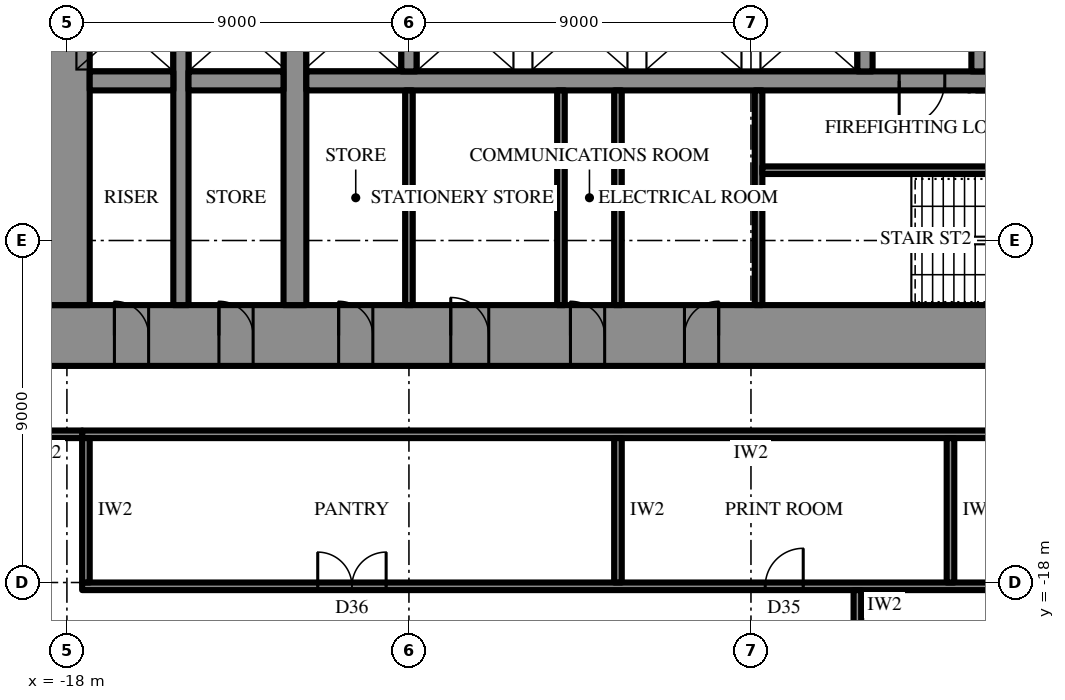
"""IFC4 building model, lengths in metres.
Left out: names, types, materials, properties, quantities, classifications, styles, units other than length and angle.
Written with IfcOpenShell. Run it as: python <this file> out.ifc"""

import sys

from ifc_helpers import new_model, si_unit, direction, frame, frame_2d, origin, place, context, subcontext, project, spatial, rectangle, extrude, element, fill, save


model = new_model("IFC4")
c1 = context("Model", 3, precision=1e-05, world=origin(), true_north=direction((0.0, 1.0)))
c2 = subcontext(c1, "Body", "Model", "MODEL_VIEW")
j1 = project(units=[si_unit("LENGTHUNIT", "METRE"), si_unit("PLANEANGLEUNIT", "RADIAN")], contexts=[c1])
p1 = place(None, origin())
s1 = spatial("IfcSite", under=j1, at=p1, CompositionType="ELEMENT")
p2 = place(p1, origin())
s2 = spatial("IfcBuilding", under=s1, at=p2, CompositionType="ELEMENT")
p3 = place(p2, frame((0.0, 0.0, 31.9)))
s3 = spatial("IfcBuildingStorey", under=s2, at=p3, CompositionType="ELEMENT", Elevation=31.9)
p4 = place(p3, frame((18.6, -11.5, 0.0), z_axis=(0.0, 0.0, 1.0), x_axis=(-1.0, 0.0, 0.0)))
e1 = element("IfcWall", 1, at=p4, inside=s3, PredefinedType="SHEAR", context=c2, shape_type="SweptSolid", body=[
    extrude(rectangle(XDim=37.2, YDim=1.6, at=frame_2d((18.6, 0.0))), origin(), (0.0, 0.0, 1.0), 4.2),
])
p5 = place(p4, frame((19.45, 0.0, 0.0)))
e2 = element("IfcOpeningElement", 2, at=p5, cuts=e1, PredefinedType="OPENING", context=c2, shape_type="SweptSolid", body=[
    extrude(rectangle(XDim=0.9, YDim=2.2, at=frame_2d((0.45, 1.1))), frame((0.0, 0.81, 0.0), z_axis=(0.0, -1.0, 0.0), x_axis=(1.0, 0.0, 0.0)), (0.0, 0.0, 1.0), 1.62),
])
p6 = place(p4, frame((22.45, 0.0, 0.0)))
e3 = element("IfcOpeningElement", 3, at=p6, cuts=e1, PredefinedType="OPENING", context=c2, shape_type="SweptSolid", body=[
    extrude(rectangle(XDim=0.9, YDim=2.2, at=frame_2d((0.45, 1.1))), frame((0.0, 0.81, 0.0), z_axis=(0.0, -1.0, 0.0), x_axis=(1.0, 0.0, 0.0)), (0.0, 0.0, 1.0), 1.62),
])
p7 = place(p4, frame((25.5, 0.0, 0.0)))
e4 = element("IfcOpeningElement", 4, at=p7, cuts=e1, PredefinedType="OPENING", context=c2, shape_type="SweptSolid", body=[
    extrude(rectangle(XDim=1.0, YDim=2.2, at=frame_2d((0.5, 1.1))), frame((0.0, 0.81, 0.0), z_axis=(0.0, -1.0, 0.0), x_axis=(1.0, 0.0, 0.0)), (0.0, 0.0, 1.0), 1.62),
])
p8 = place(p4, frame((1.85, 0.0, 0.0)))
e5 = element("IfcOpeningElement", 5, at=p8, cuts=e1, PredefinedType="OPENING", context=c2, shape_type="SweptSolid", body=[
    extrude(rectangle(XDim=0.9, YDim=2.2, at=frame_2d((0.45, 1.1))), frame((0.0, 0.81, 0.0), z_axis=(0.0, -1.0, 0.0), x_axis=(1.0, 0.0, 0.0)), (0.0, 0.0, 1.0), 1.62),
])
p9 = place(p4, frame((4.6, 0.0, 0.0)))
e6 = element("IfcOpeningElement", 6, at=p9, cuts=e1, PredefinedType="OPENING", context=c2, shape_type="SweptSolid", body=[
    extrude(rectangle(XDim=0.9, YDim=2.2, at=frame_2d((0.45, 1.1))), frame((0.0, 0.81, 0.0), z_axis=(0.0, -1.0, 0.0), x_axis=(1.0, 0.0, 0.0)), (0.0, 0.0, 1.0), 1.62),
])
p10 = place(p4, frame((7.75, 0.0, 0.0)))
e7 = element("IfcOpeningElement", 7, at=p10, cuts=e1, PredefinedType="OPENING", context=c2, shape_type="SweptSolid", body=[
    extrude(rectangle(XDim=0.9, YDim=2.2, at=frame_2d((0.45, 1.1))), frame((0.0, 0.81, 0.0), z_axis=(0.0, -1.0, 0.0), x_axis=(1.0, 0.0, 0.0)), (0.0, 0.0, 1.0), 1.62),
])
p11 = place(p4, frame((28.55, 0.0, 0.0)))
e8 = element("IfcOpeningElement", 8, at=p11, cuts=e1, PredefinedType="OPENING", context=c2, shape_type="SweptSolid", body=[
    extrude(rectangle(XDim=0.9, YDim=2.2, at=frame_2d((0.45, 1.1))), frame((0.0, 0.81, 0.0), z_axis=(0.0, -1.0, 0.0), x_axis=(1.0, 0.0, 0.0)), (0.0, 0.0, 1.0), 1.62),
])
p12 = place(p4, frame((31.7, 0.0, 0.0)))
e9 = element("IfcOpeningElement", 9, at=p12, cuts=e1, PredefinedType="OPENING", context=c2, shape_type="SweptSolid", body=[
    extrude(rectangle(XDim=0.9, YDim=2.2, at=frame_2d((0.45, 1.1))), frame((0.0, 0.81, 0.0), z_axis=(0.0, -1.0, 0.0), x_axis=(1.0, 0.0, 0.0)), (0.0, 0.0, 1.0), 1.62),
])
p13 = place(p4, frame((34.45, 0.0, 0.0)))
e10 = element("IfcOpeningElement", 10, at=p13, cuts=e1, PredefinedType="OPENING", context=c2, shape_type="SweptSolid", body=[
    extrude(rectangle(XDim=0.9, YDim=2.2, at=frame_2d((0.45, 1.1))), frame((0.0, 0.81, 0.0), z_axis=(0.0, -1.0, 0.0), x_axis=(1.0, 0.0, 0.0)), (0.0, 0.0, 1.0), 1.62),
])
p14 = place(p3, frame((-18.0, 10.7, 0.0), z_axis=(0.0, 0.0, 1.0), x_axis=(0.0, -1.0, 0.0)))
e11 = element("IfcWall", 11, at=p14, inside=s3, PredefinedType="SHEAR", context=c2, shape_type="SweptSolid", body=[
    extrude(rectangle(XDim=21.4, YDim=1.2, at=frame_2d((10.7, 0.0))), origin(), (0.0, 0.0, 1.0), 4.2),
])
p15 = place(p14, frame((9.8, 0.0, 0.0)))
e12 = element("IfcOpeningElement", 12, at=p15, cuts=e11, PredefinedType="OPENING", context=c2, shape_type="SweptSolid", body=[
    extrude(rectangle(XDim=1.8, YDim=2.4, at=frame_2d((0.9, 1.2))), frame((0.0, 0.61, 0.0), z_axis=(0.0, -1.0, 0.0), x_axis=(1.0, 0.0, 0.0)), (0.0, 0.0, 1.0), 1.22),
])
p16 = place(p3, frame((-12.0, -10.7, 0.0), z_axis=(0.0, 0.0, 1.0), x_axis=(0.0, 1.0, 0.0)))
e13 = element("IfcWall", 13, at=p16, inside=s3, PredefinedType="SHEAR", context=c2, shape_type="SweptSolid", body=[
    extrude(rectangle(XDim=21.4, YDim=0.6, at=frame_2d((10.7, 0.0))), origin(), (0.0, 0.0, 1.0), 4.2),
])
p17 = place(p16, frame((9.8, 0.0, 0.0)))
e14 = element("IfcOpeningElement", 14, at=p17, cuts=e13, PredefinedType="OPENING", context=c2, shape_type="SweptSolid", body=[
    extrude(rectangle(XDim=1.8, YDim=2.4, at=frame_2d((0.9, 1.2))), frame((0.0, 0.31, 0.0), z_axis=(0.0, -1.0, 0.0), x_axis=(1.0, 0.0, 0.0)), (0.0, 0.0, 1.0), 0.62),
])
p18 = place(p3, frame((-15.0, -10.7, 0.0), z_axis=(0.0, 0.0, 1.0), x_axis=(0.0, 1.0, 0.0)))
e15 = element("IfcWall", 15, at=p18, inside=s3, PredefinedType="SHEAR", context=c2, shape_type="SweptSolid", body=[
    extrude(rectangle(XDim=21.4, YDim=0.4, at=frame_2d((10.7, 0.0))), origin(), (0.0, 0.0, 1.0), 4.2),
])
p19 = place(p18, frame((9.8, 0.0, 0.0)))
e16 = element("IfcOpeningElement", 16, at=p19, cuts=e15, PredefinedType="OPENING", context=c2, shape_type="SweptSolid", body=[
    extrude(rectangle(XDim=1.8, YDim=2.4, at=frame_2d((0.9, 1.2))), frame((0.0, 0.21, 0.0), z_axis=(0.0, -1.0, 0.0), x_axis=(1.0, 0.0, 0.0)), (0.0, 0.0, 1.0), 0.42),
])
p20 = place(p3, frame((11.7, -4.8, 0.0), z_axis=(0.0, 0.0, 1.0), x_axis=(-1.0, 0.0, 0.0)))
e17 = element("IfcWall", 17, at=p20, inside=s3, PredefinedType="SHEAR", context=c2, shape_type="SweptSolid", body=[
    extrude(rectangle(XDim=23.4, YDim=0.5, at=frame_2d((11.7, 0.0))), origin(), (0.0, 0.0, 1.0), 4.2),
])
p21 = place(p20, frame((6.6, 0.0, 0.0)))
e18 = element("IfcOpeningElement", 18, at=p21, cuts=e17, PredefinedType="OPENING", context=c2, shape_type="SweptSolid", body=[
    extrude(rectangle(XDim=1.2, YDim=2.2, at=frame_2d((0.6, 1.1))), frame((0.0, 0.26, 0.0), z_axis=(0.0, -1.0, 0.0), x_axis=(1.0, 0.0, 0.0)), (0.0, 0.0, 1.0), 0.52),
])
p22 = place(p20, frame((3.6, 0.0, 0.0)))
e19 = element("IfcOpeningElement", 19, at=p22, cuts=e17, PredefinedType="OPENING", context=c2, shape_type="SweptSolid", body=[
    extrude(rectangle(XDim=1.2, YDim=2.2, at=frame_2d((0.6, 1.1))), frame((0.0, 0.26, 0.0), z_axis=(0.0, -1.0, 0.0), x_axis=(1.0, 0.0, 0.0)), (0.0, 0.0, 1.0), 0.52),
])
p23 = place(p3, frame((-12.3, -4.8, 0.0), z_axis=(0.0, 0.0, 1.0), x_axis=(-1.0, 0.0, 0.0)))
e20 = element("IfcWall", 20, at=p23, inside=s3, PredefinedType="SHEAR", context=c2, shape_type="SweptSolid", body=[
    extrude(rectangle(XDim=2.5, YDim=0.5, at=frame_2d((1.25, 0.0))), origin(), (0.0, 0.0, 1.0), 4.2),
])
p24 = place(p3, frame((-15.2, -4.8, 0.0), z_axis=(0.0, 0.0, 1.0), x_axis=(-1.0, 0.0, 0.0)))
e21 = element("IfcWall", 21, at=p24, inside=s3, PredefinedType="SHEAR", context=c2, shape_type="SweptSolid", body=[
    extrude(rectangle(XDim=2.2, YDim=0.5, at=frame_2d((1.1, 0.0))), origin(), (0.0, 0.0, 1.0), 4.2),
])
for number, where, z_axis, x_axis in (
    (22, (6.0, -2.25, 0.0), (0.0, 0.0, 1.0), (0.0, -1.0, 0.0)),
    (23, (3.0, -2.25, 0.0), (0.0, 0.0, 1.0), (0.0, -1.0, 0.0)),
    (24, (-9.0, -2.25, 0.0), (0.0, 0.0, 1.0), (0.0, -1.0, 0.0)),
):
    element("IfcWall", number, at=place(p3, frame(where, z_axis=z_axis, x_axis=x_axis)), inside=s3, PredefinedType="SHEAR", context=c2, shape_type="SweptSolid", body=[
        extrude(rectangle(XDim=2.3, YDim=0.4, at=frame_2d((1.15, 0.0))), origin(), (0.0, 0.0, 1.0), 4.2),
    ])
p25 = place(p3, frame((0.2, -5.05, 0.0), z_axis=(0.0, 0.0, 1.0), x_axis=(0.0, -1.0, 0.0)))
e25 = element("IfcWall", 25, at=p25, inside=s3, PredefinedType="SHEAR", context=c2, shape_type="SweptSolid", body=[
    extrude(rectangle(XDim=5.65, YDim=0.2, at=frame_2d((2.825, 0.0))), origin(), (0.0, 0.0, 1.0), 4.2),
])
p26 = place(p3, frame((8.9, -7.15, 0.0), z_axis=(0.0, 0.0, 1.0), x_axis=(-1.0, 0.0, 0.0)))
e26 = element("IfcWall", 26, at=p26, inside=s3, PredefinedType="SHEAR", context=c2, shape_type="SweptSolid", body=[
    extrude(rectangle(XDim=8.6, YDim=0.2, at=frame_2d((4.3, 0.0))), origin(), (0.0, 0.0, 1.0), 4.2),
])
p27 = place(p26, frame((0.3, 0.0, 0.0)))
e27 = element("IfcOpeningElement", 27, at=p27, cuts=e26, PredefinedType="OPENING", context=c2, shape_type="SweptSolid", body=[
    extrude(rectangle(XDim=1.0, YDim=2.2, at=frame_2d((0.5, 1.1))), frame((0.0, 0.11, 0.0), z_axis=(0.0, -1.0, 0.0), x_axis=(1.0, 0.0, 0.0)), (0.0, 0.0, 1.0), 0.22),
])
for number, where, z_axis, x_axis in (
    (28, (-9.0, -5.05, 0.0), (0.0, 0.0, 1.0), (0.0, -1.0, 0.0)),
    (29, (-3.5, -5.05, 0.0), (0.0, 0.0, 1.0), (0.0, -1.0, 0.0)),
    (30, (-5.0, -5.05, 0.0), (0.0, 0.0, 1.0), (0.0, -1.0, 0.0)),
):
    element("IfcWall", number, at=place(p3, frame(where, z_axis=z_axis, x_axis=x_axis)), inside=s3, PredefinedType="PARTITIONING", context=c2, shape_type="SweptSolid", body=[
        extrude(rectangle(XDim=5.65, YDim=0.2, at=frame_2d((2.825, 0.0))), origin(), (0.0, 0.0, 1.0), 4.0),
    ])
p28 = place(p3, frame((17.6, -14.1, 0.0), z_axis=(0.0, 0.0, 1.0), x_axis=(-1.0, 0.0, 0.0)))
e31 = element("IfcWall", 31, at=p28, inside=s3, PredefinedType="PARTITIONING", context=c2, shape_type="SweptSolid", body=[
    extrude(rectangle(XDim=35.2, YDim=0.2, at=frame_2d((17.6, 0.0))), origin(), (0.0, 0.0, 1.0), 4.0),
])
p29 = place(p3, frame((17.6, -18.1, 0.0), z_axis=(0.0, 0.0, 1.0), x_axis=(-1.0, 0.0, 0.0)))
e32 = element("IfcWall", 32, at=p29, inside=s3, PredefinedType="PARTITIONING", context=c2, shape_type="SweptSolid", body=[
    extrude(rectangle(XDim=35.2, YDim=0.2, at=frame_2d((17.6, 0.0))), origin(), (0.0, 0.0, 1.0), 4.0),
])
p30 = place(p29, frame((5.325, 0.0, 0.0)))
e33 = element("IfcOpeningElement", 33, at=p30, cuts=e32, PredefinedType="OPENING", context=c2, shape_type="SweptSolid", body=[
    extrude(rectangle(XDim=1.8, YDim=2.4, at=frame_2d((0.9, 1.2))), frame((0.0, 0.11, 0.0), z_axis=(0.0, -1.0, 0.0), x_axis=(1.0, 0.0, 0.0)), (0.0, 0.0, 1.0), 0.22),
])
p31 = place(p29, frame((16.225, 0.0, 0.0)))
e34 = element("IfcOpeningElement", 34, at=p31, cuts=e32, PredefinedType="OPENING", context=c2, shape_type="SweptSolid", body=[
    extrude(rectangle(XDim=1.0, YDim=2.2, at=frame_2d((0.5, 1.1))), frame((0.0, 0.11, 0.0), z_axis=(0.0, -1.0, 0.0), x_axis=(1.0, 0.0, 0.0)), (0.0, 0.0, 1.0), 0.22),
])
p32 = place(p29, frame((27.2, 0.0, 0.0)))
e35 = element("IfcOpeningElement", 35, at=p32, cuts=e32, PredefinedType="OPENING", context=c2, shape_type="SweptSolid", body=[
    extrude(rectangle(XDim=1.8, YDim=2.4, at=frame_2d((0.9, 1.2))), frame((0.0, 0.11, 0.0), z_axis=(0.0, -1.0, 0.0), x_axis=(1.0, 0.0, 0.0)), (0.0, 0.0, 1.0), 0.22),
])
p33 = place(p3, frame((5.25, -14.2, 0.0), z_axis=(0.0, 0.0, 1.0), x_axis=(0.0, -1.0, 0.0)))
e36 = element("IfcWall", 36, at=p33, inside=s3, PredefinedType="PARTITIONING", context=c2, shape_type="SweptSolid", body=[
    extrude(rectangle(XDim=3.8, YDim=0.2, at=frame_2d((1.9, 0.0))), origin(), (0.0, 0.0, 1.0), 2.944),
])
for number, where, z_axis, x_axis in (
    (37, (-3.5, -14.2, 0.0), (0.0, 0.0, 1.0), (0.0, -1.0, 0.0)),
    (38, (-17.5, -14.2, 0.0), (0.0, 0.0, 1.0), (0.0, -1.0, 0.0)),
):
    element("IfcWall", number, at=place(p3, frame(where, z_axis=z_axis, x_axis=x_axis)), inside=s3, PredefinedType="PARTITIONING", context=c2, shape_type="SweptSolid", body=[
        extrude(rectangle(XDim=3.8, YDim=0.2, at=frame_2d((1.9, 0.0))), origin(), (0.0, 0.0, 1.0), 4.0),
    ])
p34 = place(p3, frame((-17.6, -14.1, 0.0), z_axis=(0.0, 0.0, 1.0), x_axis=(-1.0, 0.0, 0.0)))
e39 = element("IfcWall", 39, at=p34, inside=s3, PredefinedType="PARTITIONING", context=c2, shape_type="SweptSolid", body=[
    extrude(rectangle(XDim=2.0, YDim=0.2, at=frame_2d((1.0, 0.0))), origin(), (0.0, 0.0, 1.0), 4.0),
])
p35 = place(p3, frame((2.8, -18.2, 0.0), z_axis=(0.0, 0.0, 1.0), x_axis=(0.0, -1.0, 0.0)))
e40 = element("IfcWall", 40, at=p35, inside=s3, PredefinedType="PARTITIONING", context=c2, shape_type="SweptSolid", body=[
    extrude(rectangle(XDim=15.6, YDim=0.2, at=frame_2d((7.8, 0.0))), origin(), (0.0, 0.0, 1.0), 2.944),
])
p36 = place(p21, origin())
e41 = element("IfcDoor", 41, at=p36, inside=s3, OperationType="SINGLE_SWING_LEFT", PredefinedType="DOOR", context=c2, shape_type="SweptSolid", body=[
    extrude(rectangle(XDim=1.2, YDim=2.2, at=frame_2d((0.6, 1.1))), frame((0.0, 0.025, 0.0), z_axis=(0.0, -1.0, 0.0), x_axis=(1.0, 0.0, 0.0)), (0.0, 0.0, 1.0), 0.05),
])
fill(e18, e41)
p37 = place(p5, frame((0.9, 0.0, 0.0), z_axis=(0.0, 0.0, 1.0), x_axis=(-1.0, 0.0, 0.0)))
e42 = element("IfcDoor", 42, at=p37, inside=s3, OperationType="SINGLE_SWING_LEFT", PredefinedType="DOOR", context=c2, shape_type="SweptSolid", body=[
    extrude(rectangle(XDim=0.9, YDim=2.2, at=frame_2d((0.45, 1.1))), frame((0.0, 0.025, 0.0), z_axis=(0.0, -1.0, 0.0), x_axis=(1.0, 0.0, 0.0)), (0.0, 0.0, 1.0), 0.05),
])
fill(e2, e42)
p38 = place(p6, frame((0.9, 0.0, 0.0), z_axis=(0.0, 0.0, 1.0), x_axis=(-1.0, 0.0, 0.0)))
e43 = element("IfcDoor", 43, at=p38, inside=s3, OperationType="SINGLE_SWING_RIGHT", PredefinedType="DOOR", context=c2, shape_type="SweptSolid", body=[
    extrude(rectangle(XDim=0.9, YDim=2.2, at=frame_2d((0.45, 1.1))), frame((0.0, 0.025, 0.0), z_axis=(0.0, -1.0, 0.0), x_axis=(1.0, 0.0, 0.0)), (0.0, 0.0, 1.0), 0.05),
])
fill(e3, e43)
p39 = place(p7, frame((1.0, 0.0, 0.0), z_axis=(0.0, 0.0, 1.0), x_axis=(-1.0, 0.0, 0.0)))
e44 = element("IfcDoor", 44, at=p39, inside=s3, OperationType="SINGLE_SWING_RIGHT", PredefinedType="DOOR", context=c2, shape_type="SweptSolid", body=[
    extrude(rectangle(XDim=1.0, YDim=2.2, at=frame_2d((0.5, 1.1))), frame((0.0, 0.025, 0.0), z_axis=(0.0, -1.0, 0.0), x_axis=(1.0, 0.0, 0.0)), (0.0, 0.0, 1.0), 0.05),
])
fill(e4, e44)
p40 = place(p11, frame((0.9, 0.0, 0.0), z_axis=(0.0, 0.0, 1.0), x_axis=(-1.0, 0.0, 0.0)))
e45 = element("IfcDoor", 45, at=p40, inside=s3, OperationType="SINGLE_SWING_RIGHT", PredefinedType="DOOR", context=c2, shape_type="SweptSolid", body=[
    extrude(rectangle(XDim=0.9, YDim=2.2, at=frame_2d((0.45, 1.1))), frame((0.0, 0.025, 0.0), z_axis=(0.0, -1.0, 0.0), x_axis=(1.0, 0.0, 0.0)), (0.0, 0.0, 1.0), 0.05),
])
fill(e8, e45)
p41 = place(p12, frame((0.9, 0.0, 0.0), z_axis=(0.0, 0.0, 1.0), x_axis=(-1.0, 0.0, 0.0)))
e46 = element("IfcDoor", 46, at=p41, inside=s3, OperationType="SINGLE_SWING_RIGHT", PredefinedType="DOOR", context=c2, shape_type="SweptSolid", body=[
    extrude(rectangle(XDim=0.9, YDim=2.2, at=frame_2d((0.45, 1.1))), frame((0.0, 0.025, 0.0), z_axis=(0.0, -1.0, 0.0), x_axis=(1.0, 0.0, 0.0)), (0.0, 0.0, 1.0), 0.05),
])
fill(e9, e46)
p42 = place(p13, frame((0.9, 0.0, 0.0), z_axis=(0.0, 0.0, 1.0), x_axis=(-1.0, 0.0, 0.0)))
e47 = element("IfcDoor", 47, at=p42, inside=s3, OperationType="SINGLE_SWING_RIGHT", PredefinedType="DOOR", context=c2, shape_type="SweptSolid", body=[
    extrude(rectangle(XDim=0.9, YDim=2.2, at=frame_2d((0.45, 1.1))), frame((0.0, 0.025, 0.0), z_axis=(0.0, -1.0, 0.0), x_axis=(1.0, 0.0, 0.0)), (0.0, 0.0, 1.0), 0.05),
])
fill(e10, e47)
p43 = place(p31, frame((1.0, 0.0, 0.0), z_axis=(0.0, 0.0, 1.0), x_axis=(-1.0, 0.0, 0.0)))
e48 = element("IfcDoor", 48, at=p43, inside=s3, OperationType="SINGLE_SWING_LEFT", PredefinedType="DOOR", context=c2, shape_type="SweptSolid", body=[
    extrude(rectangle(XDim=1.0, YDim=2.2, at=frame_2d((0.5, 1.1))), frame((0.0, 0.025, 0.0), z_axis=(0.0, -1.0, 0.0), x_axis=(1.0, 0.0, 0.0)), (0.0, 0.0, 1.0), 0.05),
])
fill(e34, e48)
p44 = place(p32, frame((1.8, 0.0, 0.0), z_axis=(0.0, 0.0, 1.0), x_axis=(-1.0, 0.0, 0.0)))
e49 = element("IfcDoor", 49, at=p44, inside=s3, OperationType="DOUBLE_DOOR_SINGLE_SWING", PredefinedType="DOOR", context=c2, shape_type="SweptSolid", body=[
    extrude(rectangle(XDim=1.8, YDim=2.4, at=frame_2d((0.9, 1.2))), frame((0.0, 0.025, 0.0), z_axis=(0.0, -1.0, 0.0), x_axis=(1.0, 0.0, 0.0)), (0.0, 0.0, 1.0), 0.05),
])
fill(e35, e49)
save(model, sys.argv[1])
